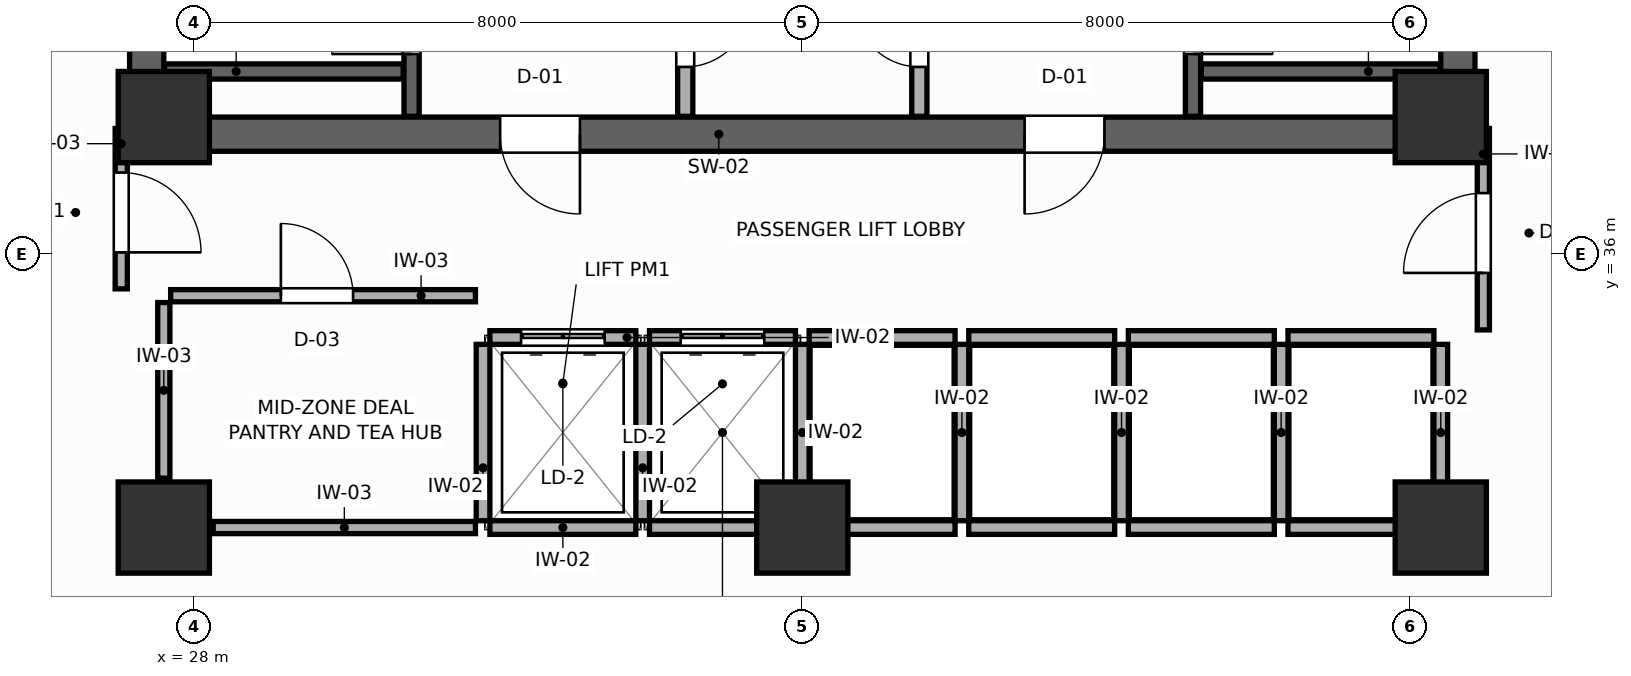
"""IFC4 building model, lengths in metres.
Left out: names, types, materials, properties, quantities, classifications, styles, units other than length and angle.
Written with IfcOpenShell. Run it as: python <this file> out.ifc"""

import sys

from ifc_helpers import new_model, si_unit, direction, frame, frame_2d, origin, origin_2d, place, context, subcontext, project, spatial, rectangle, extrude, source, transform, mapped, element, fill, save


model = new_model("IFC4")
c1 = context("Model", 3, precision=1e-05, world=origin(), true_north=direction((0.0, 1.0)))
c2 = subcontext(c1, "Body", "Model", "MODEL_VIEW")
j1 = project(units=[si_unit("LENGTHUNIT", "METRE"), si_unit("PLANEANGLEUNIT", "RADIAN")], contexts=[c1])
p1 = place(None, origin())
s1 = spatial("IfcSite", under=j1, at=p1, CompositionType="ELEMENT")
p2 = place(p1, origin())
s2 = spatial("IfcBuilding", under=s1, at=p2, CompositionType="ELEMENT")
p3 = place(p2, frame((0.0, 0.0, 106.2)))
s3 = spatial("IfcBuildingStorey", under=s2, at=p3, CompositionType="ELEMENT", Elevation=106.2)
p4 = place(p3, frame((27.15, 37.575, 0.0), z_axis=(0.0, 0.0, 1.0), x_axis=(1.0, 0.0, 0.0)))
e1 = element("IfcWall", 1, at=p4, inside=s3, PredefinedType="SHEAR", context=c2, shape_type="SweptSolid", body=[
    extrude(rectangle(XDim=17.7, YDim=0.45, at=frame_2d((8.85, 0.0))), origin(), (0.0, 0.0, 1.0), 3.6),
])
p5 = place(p4, frame((4.875, 0.0, 0.0)))
e2 = element("IfcOpeningElement", 2, at=p5, cuts=e1, PredefinedType="OPENING", context=c2, shape_type="SweptSolid", body=[
    extrude(rectangle(XDim=1.05, YDim=2.1, at=frame_2d((0.525, 1.05))), frame((0.0, 0.235, 0.0), z_axis=(0.0, -1.0, 0.0), x_axis=(1.0, 0.0, 0.0)), (0.0, 0.0, 1.0), 0.47),
])
p6 = place(p4, frame((11.775, 0.0, 0.0)))
e3 = element("IfcOpeningElement", 3, at=p6, cuts=e1, PredefinedType="OPENING", context=c2, shape_type="SweptSolid", body=[
    extrude(rectangle(XDim=1.05, YDim=2.1, at=frame_2d((0.525, 1.05))), frame((0.0, 0.235, 0.0), z_axis=(0.0, -1.0, 0.0), x_axis=(1.0, 0.0, 0.0)), (0.0, 0.0, 1.0), 0.47),
])
for number, where, z_axis, x_axis in (
    (4, (27.375, 37.8, 0.0), (0.0, 0.0, 1.0), (0.0, 1.0, 0.0)),
    (5, (44.625, 37.8, 0.0), (0.0, 0.0, 1.0), (0.0, 1.0, 0.0)),
):
    element("IfcWall", number, at=place(p3, frame(where, z_axis=z_axis, x_axis=x_axis)), inside=s3, PredefinedType="SHEAR", context=c2, shape_type="SweptSolid", body=[
        extrude(rectangle(XDim=9.0, YDim=0.45, at=frame_2d((4.5, 0.0))), origin(), (0.0, 0.0, 1.0), 3.6),
    ])
m1 = source(origin(), c2, "Body", "SweptSolid", [
    extrude(rectangle(XDim=1.2, YDim=1.2, at=origin_2d()), origin(), (0.0, 0.0, 1.0), 3.6),
])
for number, where, z_axis, x_axis in (
    (6, (27.6, 37.8, 0.0), (0.0, 0.0, 1.0), (1.0, 0.0, 0.0)),
    (7, (44.4, 37.8, 0.0), (0.0, 0.0, 1.0), (1.0, 0.0, 0.0)),
    (8, (27.6, 32.4, 0.0), (0.0, 0.0, 1.0), (1.0, 0.0, 0.0)),
    (9, (44.4, 32.4, 0.0), (0.0, 0.0, 1.0), (1.0, 0.0, 0.0)),
    (10, (36.0, 32.4, 0.0), (0.0, 0.0, 1.0), (1.0, 0.0, 0.0)),
):
    element("IfcColumn", number, at=place(p3, frame(where, z_axis=z_axis, x_axis=x_axis)), inside=s3, PredefinedType="COLUMN", context=c2, shape_type="MappedRepresentation", body=[
        mapped(m1, transform((0.0, 0.0, 0.0), scale=1.0)),
    ])
p7 = place(p3, frame((30.86, 37.81, 0.0), z_axis=(0.0, 0.0, 1.0), x_axis=(0.0, 1.0, 0.0)))
e11 = element("IfcWall", 11, at=p7, inside=s3, PredefinedType="SHEAR", context=c2, shape_type="SweptSolid", body=[
    extrude(rectangle(XDim=8.98, YDim=0.2, at=frame_2d((4.49, 0.0))), origin(), (0.0, 0.0, 1.0), 3.6),
])
p8 = place(p7, frame((0.82, 0.0, 0.0)))
e12 = element("IfcOpeningElement", 12, at=p8, cuts=e11, PredefinedType="OPENING", context=c2, shape_type="SweptSolid", body=[
    extrude(rectangle(XDim=1.05, YDim=2.1, at=frame_2d((0.525, 1.05))), frame((0.0, 0.11, 0.0), z_axis=(0.0, -1.0, 0.0), x_axis=(1.0, 0.0, 0.0)), (0.0, 0.0, 1.0), 0.22),
])
p9 = place(p3, frame((27.61, 38.4, 0.0), z_axis=(0.0, 0.0, 1.0), x_axis=(1.0, 0.0, 0.0)))
e13 = element("IfcWall", 13, at=p9, inside=s3, PredefinedType="SHEAR", context=c2, shape_type="SweptSolid", body=[
    extrude(rectangle(XDim=3.14, YDim=0.2, at=frame_2d((1.57, 0.0))), origin(), (0.0, 0.0, 1.0), 3.6),
])
p10 = place(p3, frame((41.14, 37.81, 0.0), z_axis=(0.0, 0.0, 1.0), x_axis=(0.0, 1.0, 0.0)))
e14 = element("IfcWall", 14, at=p10, inside=s3, PredefinedType="SHEAR", context=c2, shape_type="SweptSolid", body=[
    extrude(rectangle(XDim=8.98, YDim=0.2, at=frame_2d((4.49, 0.0))), origin(), (0.0, 0.0, 1.0), 3.6),
])
p11 = place(p10, frame((0.82, 0.0, 0.0)))
e15 = element("IfcOpeningElement", 15, at=p11, cuts=e14, PredefinedType="OPENING", context=c2, shape_type="SweptSolid", body=[
    extrude(rectangle(XDim=1.05, YDim=2.1, at=frame_2d((0.525, 1.05))), frame((0.0, 0.11, 0.0), z_axis=(0.0, -1.0, 0.0), x_axis=(1.0, 0.0, 0.0)), (0.0, 0.0, 1.0), 0.22),
])
p12 = place(p3, frame((41.25, 38.4, 0.0), z_axis=(0.0, 0.0, 1.0), x_axis=(1.0, 0.0, 0.0)))
e16 = element("IfcWall", 16, at=p12, inside=s3, PredefinedType="SHEAR", context=c2, shape_type="SweptSolid", body=[
    extrude(rectangle(XDim=3.14, YDim=0.2, at=frame_2d((1.57, 0.0))), origin(), (0.0, 0.0, 1.0), 3.6),
])
p13 = place(p3, frame((34.46, 37.81, 0.0), z_axis=(0.0, 0.0, 1.0), x_axis=(0.0, 1.0, 0.0)))
e17 = element("IfcWall", 17, at=p13, inside=s3, PredefinedType="PARTITIONING", context=c2, shape_type="SweptSolid", body=[
    extrude(rectangle(XDim=8.98, YDim=0.2, at=frame_2d((4.49, 0.0))), origin(), (0.0, 0.0, 1.0), 3.4),
])
p14 = place(p13, frame((0.65, 0.0, 0.0)))
e18 = element("IfcOpeningElement", 18, at=p14, cuts=e17, PredefinedType="OPENING", context=c2, shape_type="SweptSolid", body=[
    extrude(rectangle(XDim=0.85, YDim=2.05, at=frame_2d((0.425, 1.025))), frame((0.0, 0.11, 0.0), z_axis=(0.0, -1.0, 0.0), x_axis=(1.0, 0.0, 0.0)), (0.0, 0.0, 1.0), 0.22),
])
p15 = place(p3, frame((37.54, 37.81, 0.0), z_axis=(0.0, 0.0, 1.0), x_axis=(0.0, 1.0, 0.0)))
e19 = element("IfcWall", 19, at=p15, inside=s3, PredefinedType="PARTITIONING", context=c2, shape_type="SweptSolid", body=[
    extrude(rectangle(XDim=8.98, YDim=0.2, at=frame_2d((4.49, 0.0))), origin(), (0.0, 0.0, 1.0), 3.4),
])
p16 = place(p15, frame((0.65, 0.0, 0.0)))
e20 = element("IfcOpeningElement", 20, at=p16, cuts=e19, PredefinedType="OPENING", context=c2, shape_type="SweptSolid", body=[
    extrude(rectangle(XDim=0.85, YDim=2.05, at=frame_2d((0.425, 1.025))), frame((0.0, 0.11, 0.0), z_axis=(0.0, -1.0, 0.0), x_axis=(1.0, 0.0, 0.0)), (0.0, 0.0, 1.0), 0.22),
])
p17 = place(p3, frame((31.89, 34.9, 0.0), z_axis=(0.0, 0.0, 1.0), x_axis=(1.0, 0.0, 0.0)))
e21 = element("IfcWall", 21, at=p17, inside=s3, PredefinedType="PARTITIONING", context=c2, shape_type="SweptSolid", body=[
    extrude(rectangle(XDim=1.92, YDim=0.18, at=frame_2d((0.96, 0.0))), origin(), (0.0, 0.0, 1.0), 3.4),
])
p18 = place(p17, frame((0.41, 0.0, 0.0)))
e22 = element("IfcOpeningElement", 22, at=p18, cuts=e21, PredefinedType="OPENING", context=c2, shape_type="SweptSolid", body=[
    extrude(rectangle(XDim=1.1, YDim=2.1, at=frame_2d((0.55, 1.05))), frame((0.0, 0.1, 0.0), z_axis=(0.0, -1.0, 0.0), x_axis=(1.0, 0.0, 0.0)), (0.0, 0.0, 1.0), 0.2),
])
p19 = place(p3, frame((31.89, 32.4, 0.0), z_axis=(0.0, 0.0, 1.0), x_axis=(1.0, 0.0, 0.0)))
e23 = element("IfcWall", 23, at=p19, inside=s3, PredefinedType="PARTITIONING", context=c2, shape_type="SweptSolid", body=[
    extrude(rectangle(XDim=1.92, YDim=0.18, at=frame_2d((0.96, 0.0))), origin(), (0.0, 0.0, 1.0), 2.16),
])
p20 = place(p3, frame((31.8, 32.49, 0.0), z_axis=(0.0, 0.0, 1.0), x_axis=(0.0, 1.0, 0.0)))
e24 = element("IfcWall", 24, at=p20, inside=s3, PredefinedType="PARTITIONING", context=c2, shape_type="SweptSolid", body=[
    extrude(rectangle(XDim=2.32, YDim=0.18, at=frame_2d((1.16, 0.0))), origin(), (0.0, 0.0, 1.0), 3.4),
])
p21 = place(p3, frame((33.99, 34.9, 0.0), z_axis=(0.0, 0.0, 1.0), x_axis=(1.0, 0.0, 0.0)))
e25 = element("IfcWall", 25, at=p21, inside=s3, PredefinedType="PARTITIONING", context=c2, shape_type="SweptSolid", body=[
    extrude(rectangle(XDim=1.92, YDim=0.18, at=frame_2d((0.96, 0.0))), origin(), (0.0, 0.0, 1.0), 3.4),
])
p22 = place(p21, frame((0.41, 0.0, 0.0)))
e26 = element("IfcOpeningElement", 26, at=p22, cuts=e25, PredefinedType="OPENING", context=c2, shape_type="SweptSolid", body=[
    extrude(rectangle(XDim=1.1, YDim=2.1, at=frame_2d((0.55, 1.05))), frame((0.0, 0.1, 0.0), z_axis=(0.0, -1.0, 0.0), x_axis=(1.0, 0.0, 0.0)), (0.0, 0.0, 1.0), 0.2),
])
p23 = place(p3, frame((33.99, 32.4, 0.0), z_axis=(0.0, 0.0, 1.0), x_axis=(1.0, 0.0, 0.0)))
e27 = element("IfcWall", 27, at=p23, inside=s3, PredefinedType="PARTITIONING", context=c2, shape_type="SweptSolid", body=[
    extrude(rectangle(XDim=1.92, YDim=0.18, at=frame_2d((0.96, 0.0))), origin(), (0.0, 0.0, 1.0), 2.16),
])
p24 = place(p3, frame((33.9, 32.49, 0.0), z_axis=(0.0, 0.0, 1.0), x_axis=(0.0, 1.0, 0.0)))
e28 = element("IfcWall", 28, at=p24, inside=s3, PredefinedType="PARTITIONING", context=c2, shape_type="SweptSolid", body=[
    extrude(rectangle(XDim=2.32, YDim=0.18, at=frame_2d((1.16, 0.0))), origin(), (0.0, 0.0, 1.0), 3.4),
])
p25 = place(p3, frame((36.09, 34.9, 0.0), z_axis=(0.0, 0.0, 1.0), x_axis=(1.0, 0.0, 0.0)))
e29 = element("IfcWall", 29, at=p25, inside=s3, PredefinedType="PARTITIONING", context=c2, shape_type="SweptSolid", body=[
    extrude(rectangle(XDim=1.92, YDim=0.18, at=frame_2d((0.96, 0.0))), origin(), (0.0, 0.0, 1.0), 3.4),
])
p26 = place(p3, frame((36.09, 32.4, 0.0), z_axis=(0.0, 0.0, 1.0), x_axis=(1.0, 0.0, 0.0)))
e30 = element("IfcWall", 30, at=p26, inside=s3, PredefinedType="PARTITIONING", context=c2, shape_type="SweptSolid", body=[
    extrude(rectangle(XDim=1.92, YDim=0.18, at=frame_2d((0.96, 0.0))), origin(), (0.0, 0.0, 1.0), 2.16),
])
p27 = place(p3, frame((36.0, 32.49, 0.0), z_axis=(0.0, 0.0, 1.0), x_axis=(0.0, 1.0, 0.0)))
e31 = element("IfcWall", 31, at=p27, inside=s3, PredefinedType="PARTITIONING", context=c2, shape_type="SweptSolid", body=[
    extrude(rectangle(XDim=2.32, YDim=0.18, at=frame_2d((1.16, 0.0))), origin(), (0.0, 0.0, 1.0), 3.4),
])
p28 = place(p3, frame((38.19, 34.9, 0.0), z_axis=(0.0, 0.0, 1.0), x_axis=(1.0, 0.0, 0.0)))
e32 = element("IfcWall", 32, at=p28, inside=s3, PredefinedType="PARTITIONING", context=c2, shape_type="SweptSolid", body=[
    extrude(rectangle(XDim=1.92, YDim=0.18, at=frame_2d((0.96, 0.0))), origin(), (0.0, 0.0, 1.0), 3.4),
])
p29 = place(p3, frame((38.19, 32.4, 0.0), z_axis=(0.0, 0.0, 1.0), x_axis=(1.0, 0.0, 0.0)))
e33 = element("IfcWall", 33, at=p29, inside=s3, PredefinedType="PARTITIONING", context=c2, shape_type="SweptSolid", body=[
    extrude(rectangle(XDim=1.92, YDim=0.18, at=frame_2d((0.96, 0.0))), origin(), (0.0, 0.0, 1.0), 2.16),
])
p30 = place(p3, frame((38.1, 32.49, 0.0), z_axis=(0.0, 0.0, 1.0), x_axis=(0.0, 1.0, 0.0)))
e34 = element("IfcWall", 34, at=p30, inside=s3, PredefinedType="PARTITIONING", context=c2, shape_type="SweptSolid", body=[
    extrude(rectangle(XDim=2.32, YDim=0.18, at=frame_2d((1.16, 0.0))), origin(), (0.0, 0.0, 1.0), 3.4),
])
p31 = place(p3, frame((40.29, 34.9, 0.0), z_axis=(0.0, 0.0, 1.0), x_axis=(1.0, 0.0, 0.0)))
e35 = element("IfcWall", 35, at=p31, inside=s3, PredefinedType="PARTITIONING", context=c2, shape_type="SweptSolid", body=[
    extrude(rectangle(XDim=1.92, YDim=0.18, at=frame_2d((0.96, 0.0))), origin(), (0.0, 0.0, 1.0), 3.4),
])
p32 = place(p3, frame((40.29, 32.4, 0.0), z_axis=(0.0, 0.0, 1.0), x_axis=(1.0, 0.0, 0.0)))
e36 = element("IfcWall", 36, at=p32, inside=s3, PredefinedType="PARTITIONING", context=c2, shape_type="SweptSolid", body=[
    extrude(rectangle(XDim=1.92, YDim=0.18, at=frame_2d((0.96, 0.0))), origin(), (0.0, 0.0, 1.0), 2.16),
])
p33 = place(p3, frame((40.2, 32.49, 0.0), z_axis=(0.0, 0.0, 1.0), x_axis=(0.0, 1.0, 0.0)))
e37 = element("IfcWall", 37, at=p33, inside=s3, PredefinedType="PARTITIONING", context=c2, shape_type="SweptSolid", body=[
    extrude(rectangle(XDim=2.32, YDim=0.18, at=frame_2d((1.16, 0.0))), origin(), (0.0, 0.0, 1.0), 3.4),
])
p34 = place(p3, frame((42.39, 34.9, 0.0), z_axis=(0.0, 0.0, 1.0), x_axis=(1.0, 0.0, 0.0)))
e38 = element("IfcWall", 38, at=p34, inside=s3, PredefinedType="PARTITIONING", context=c2, shape_type="SweptSolid", body=[
    extrude(rectangle(XDim=1.92, YDim=0.18, at=frame_2d((0.96, 0.0))), origin(), (0.0, 0.0, 1.0), 3.4),
])
p35 = place(p3, frame((42.39, 32.4, 0.0), z_axis=(0.0, 0.0, 1.0), x_axis=(1.0, 0.0, 0.0)))
e39 = element("IfcWall", 39, at=p35, inside=s3, PredefinedType="PARTITIONING", context=c2, shape_type="SweptSolid", body=[
    extrude(rectangle(XDim=1.92, YDim=0.18, at=frame_2d((0.96, 0.0))), origin(), (0.0, 0.0, 1.0), 2.16),
])
for number, where, z_axis, x_axis in (
    (40, (42.3, 32.49, 0.0), (0.0, 0.0, 1.0), (0.0, 1.0, 0.0)),
    (41, (44.4, 32.49, 0.0), (0.0, 0.0, 1.0), (0.0, 1.0, 0.0)),
):
    element("IfcWall", number, at=place(p3, frame(where, z_axis=z_axis, x_axis=x_axis)), inside=s3, PredefinedType="PARTITIONING", context=c2, shape_type="SweptSolid", body=[
        extrude(rectangle(XDim=2.32, YDim=0.18, at=frame_2d((1.16, 0.0))), origin(), (0.0, 0.0, 1.0), 3.4),
    ])
p36 = place(p3, frame((28.25, 32.4, 0.0), z_axis=(0.0, 0.0, 1.0), x_axis=(1.0, 0.0, 0.0)))
e42 = element("IfcWall", 42, at=p36, inside=s3, PredefinedType="PARTITIONING", context=c2, shape_type="SweptSolid", body=[
    extrude(rectangle(XDim=3.45, YDim=0.16, at=frame_2d((1.725, 0.0))), origin(), (0.0, 0.0, 1.0), 2.16),
])
p37 = place(p3, frame((27.6, 33.05, 0.0), z_axis=(0.0, 0.0, 1.0), x_axis=(0.0, 1.0, 0.0)))
e43 = element("IfcWall", 43, at=p37, inside=s3, PredefinedType="PARTITIONING", context=c2, shape_type="SweptSolid", body=[
    extrude(rectangle(XDim=2.31, YDim=0.16, at=frame_2d((1.155, 0.0))), origin(), (0.0, 0.0, 1.0), 3.4),
])
p38 = place(p3, frame((27.69, 35.45, 0.0), z_axis=(0.0, 0.0, 1.0), x_axis=(1.0, 0.0, 0.0)))
e44 = element("IfcWall", 44, at=p38, inside=s3, PredefinedType="PARTITIONING", context=c2, shape_type="SweptSolid", body=[
    extrude(rectangle(XDim=4.01, YDim=0.16, at=frame_2d((2.005, 0.0))), origin(), (0.0, 0.0, 1.0), 3.4),
])
p39 = place(p38, frame((1.45, 0.0, 0.0)))
e45 = element("IfcOpeningElement", 45, at=p39, cuts=e44, PredefinedType="OPENING", context=c2, shape_type="SweptSolid", body=[
    extrude(rectangle(XDim=0.95, YDim=2.05, at=frame_2d((0.475, 1.025))), frame((0.0, 0.09, 0.0), z_axis=(0.0, -1.0, 0.0), x_axis=(1.0, 0.0, 0.0)), (0.0, 0.0, 1.0), 0.18),
])
p40 = place(p3, frame((27.04, 35.54, 0.0), z_axis=(0.0, 0.0, 1.0), x_axis=(0.0, 1.0, 0.0)))
e46 = element("IfcWall", 46, at=p40, inside=s3, PredefinedType="PARTITIONING", context=c2, shape_type="SweptSolid", body=[
    extrude(rectangle(XDim=2.11, YDim=0.16, at=frame_2d((1.055, 0.0))), origin(), (0.0, 0.0, 1.0), 3.4),
])
p41 = place(p40, frame((0.48, 0.0, 0.0)))
e47 = element("IfcOpeningElement", 47, at=p41, cuts=e46, PredefinedType="OPENING", context=c2, shape_type="SweptSolid", body=[
    extrude(rectangle(XDim=1.05, YDim=2.1, at=frame_2d((0.525, 1.05))), frame((0.0, 0.09, 0.0), z_axis=(0.0, -1.0, 0.0), x_axis=(1.0, 0.0, 0.0)), (0.0, 0.0, 1.0), 0.18),
])
p42 = place(p3, frame((44.96, 35.0, 0.0), z_axis=(0.0, 0.0, 1.0), x_axis=(0.0, 1.0, 0.0)))
e48 = element("IfcWall", 48, at=p42, inside=s3, PredefinedType="PARTITIONING", context=c2, shape_type="SweptSolid", body=[
    extrude(rectangle(XDim=2.65, YDim=0.16, at=frame_2d((1.325, 0.0))), origin(), (0.0, 0.0, 1.0), 3.4),
])
p43 = place(p42, frame((0.75, 0.0, 0.0)))
e49 = element("IfcOpeningElement", 49, at=p43, cuts=e48, PredefinedType="OPENING", context=c2, shape_type="SweptSolid", body=[
    extrude(rectangle(XDim=1.05, YDim=2.1, at=frame_2d((0.525, 1.05))), frame((0.0, 0.09, 0.0), z_axis=(0.0, -1.0, 0.0), x_axis=(1.0, 0.0, 0.0)), (0.0, 0.0, 1.0), 0.18),
])
p44 = place(p8, origin())
e50 = element("IfcDoor", 50, at=p44, inside=s3, OperationType="SINGLE_SWING_LEFT", PredefinedType="DOOR", context=c2, shape_type="SweptSolid", body=[
    extrude(rectangle(XDim=1.05, YDim=2.1, at=frame_2d((0.525, 1.05))), frame((0.0, 0.025, 0.0), z_axis=(0.0, -1.0, 0.0), x_axis=(1.0, 0.0, 0.0)), (0.0, 0.0, 1.0), 0.05),
])
fill(e12, e50)
p45 = place(p11, frame((1.05, 0.0, 0.0), z_axis=(0.0, 0.0, 1.0), x_axis=(-1.0, 0.0, 0.0)))
e51 = element("IfcDoor", 51, at=p45, inside=s3, OperationType="SINGLE_SWING_RIGHT", PredefinedType="DOOR", context=c2, shape_type="SweptSolid", body=[
    extrude(rectangle(XDim=1.05, YDim=2.1, at=frame_2d((0.525, 1.05))), frame((0.0, 0.025, 0.0), z_axis=(0.0, -1.0, 0.0), x_axis=(1.0, 0.0, 0.0)), (0.0, 0.0, 1.0), 0.05),
])
fill(e15, e51)
p46 = place(p14, frame((0.85, 0.0, 0.0), z_axis=(0.0, 0.0, 1.0), x_axis=(-1.0, 0.0, 0.0)))
e52 = element("IfcDoor", 52, at=p46, inside=s3, OperationType="SINGLE_SWING_LEFT", PredefinedType="DOOR", context=c2, shape_type="SweptSolid", body=[
    extrude(rectangle(XDim=0.85, YDim=2.05, at=frame_2d((0.425, 1.025))), frame((0.0, 0.025, 0.0), z_axis=(0.0, -1.0, 0.0), x_axis=(1.0, 0.0, 0.0)), (0.0, 0.0, 1.0), 0.05),
])
fill(e18, e52)
p47 = place(p16, origin())
e53 = element("IfcDoor", 53, at=p47, inside=s3, OperationType="SINGLE_SWING_RIGHT", PredefinedType="DOOR", context=c2, shape_type="SweptSolid", body=[
    extrude(rectangle(XDim=0.85, YDim=2.05, at=frame_2d((0.425, 1.025))), frame((0.0, 0.025, 0.0), z_axis=(0.0, -1.0, 0.0), x_axis=(1.0, 0.0, 0.0)), (0.0, 0.0, 1.0), 0.05),
])
fill(e20, e53)
p48 = place(p18, origin())
e54 = element("IfcDoor", 54, at=p48, inside=s3, OperationType="DOUBLE_DOOR_SLIDING", PredefinedType="DOOR", context=c2, shape_type="SweptSolid", body=[
    extrude(rectangle(XDim=1.1, YDim=2.1, at=frame_2d((0.55, 1.05))), frame((0.0, 0.025, 0.0), z_axis=(0.0, -1.0, 0.0), x_axis=(1.0, 0.0, 0.0)), (0.0, 0.0, 1.0), 0.05),
])
fill(e22, e54)
p49 = place(p22, origin())
e55 = element("IfcDoor", 55, at=p49, inside=s3, OperationType="DOUBLE_DOOR_SLIDING", PredefinedType="DOOR", context=c2, shape_type="SweptSolid", body=[
    extrude(rectangle(XDim=1.1, YDim=2.1, at=frame_2d((0.55, 1.05))), frame((0.0, 0.025, 0.0), z_axis=(0.0, -1.0, 0.0), x_axis=(1.0, 0.0, 0.0)), (0.0, 0.0, 1.0), 0.05),
])
fill(e26, e55)
p50 = place(p39, origin())
e56 = element("IfcDoor", 56, at=p50, inside=s3, OperationType="SINGLE_SWING_LEFT", PredefinedType="DOOR", context=c2, shape_type="SweptSolid", body=[
    extrude(rectangle(XDim=0.95, YDim=2.05, at=frame_2d((0.475, 1.025))), frame((0.0, 0.025, 0.0), z_axis=(0.0, -1.0, 0.0), x_axis=(1.0, 0.0, 0.0)), (0.0, 0.0, 1.0), 0.05),
])
fill(e45, e56)
p51 = place(p41, frame((1.05, 0.0, 0.0), z_axis=(0.0, 0.0, 1.0), x_axis=(-1.0, 0.0, 0.0)))
e57 = element("IfcDoor", 57, at=p51, inside=s3, OperationType="SINGLE_SWING_RIGHT", PredefinedType="DOOR", context=c2, shape_type="SweptSolid", body=[
    extrude(rectangle(XDim=1.05, YDim=2.1, at=frame_2d((0.525, 1.05))), frame((0.0, 0.025, 0.0), z_axis=(0.0, -1.0, 0.0), x_axis=(1.0, 0.0, 0.0)), (0.0, 0.0, 1.0), 0.05),
])
fill(e47, e57)
p52 = place(p43, origin())
e58 = element("IfcDoor", 58, at=p52, inside=s3, OperationType="SINGLE_SWING_LEFT", PredefinedType="DOOR", context=c2, shape_type="SweptSolid", body=[
    extrude(rectangle(XDim=1.05, YDim=2.1, at=frame_2d((0.525, 1.05))), frame((0.0, 0.025, 0.0), z_axis=(0.0, -1.0, 0.0), x_axis=(1.0, 0.0, 0.0)), (0.0, 0.0, 1.0), 0.05),
])
fill(e49, e58)
p53 = place(p5, frame((1.05, 0.0, 0.0), z_axis=(0.0, 0.0, 1.0), x_axis=(-1.0, 0.0, 0.0)))
e59 = element("IfcDoor", 59, at=p53, inside=s3, OperationType="SINGLE_SWING_LEFT", PredefinedType="DOOR", context=c2, shape_type="SweptSolid", body=[
    extrude(rectangle(XDim=1.05, YDim=2.1, at=frame_2d((0.525, 1.05))), frame((0.0, 0.025, 0.0), z_axis=(0.0, -1.0, 0.0), x_axis=(1.0, 0.0, 0.0)), (0.0, 0.0, 1.0), 0.05),
])
fill(e2, e59)
p54 = place(p6, frame((1.05, 0.0, 0.0), z_axis=(0.0, 0.0, 1.0), x_axis=(-1.0, 0.0, 0.0)))
e60 = element("IfcDoor", 60, at=p54, inside=s3, OperationType="SINGLE_SWING_RIGHT", PredefinedType="DOOR", context=c2, shape_type="SweptSolid", body=[
    extrude(rectangle(XDim=1.05, YDim=2.1, at=frame_2d((0.525, 1.05))), frame((0.0, 0.025, 0.0), z_axis=(0.0, -1.0, 0.0), x_axis=(1.0, 0.0, 0.0)), (0.0, 0.0, 1.0), 0.05),
])
fill(e3, e60)
save(model, sys.argv[1])
